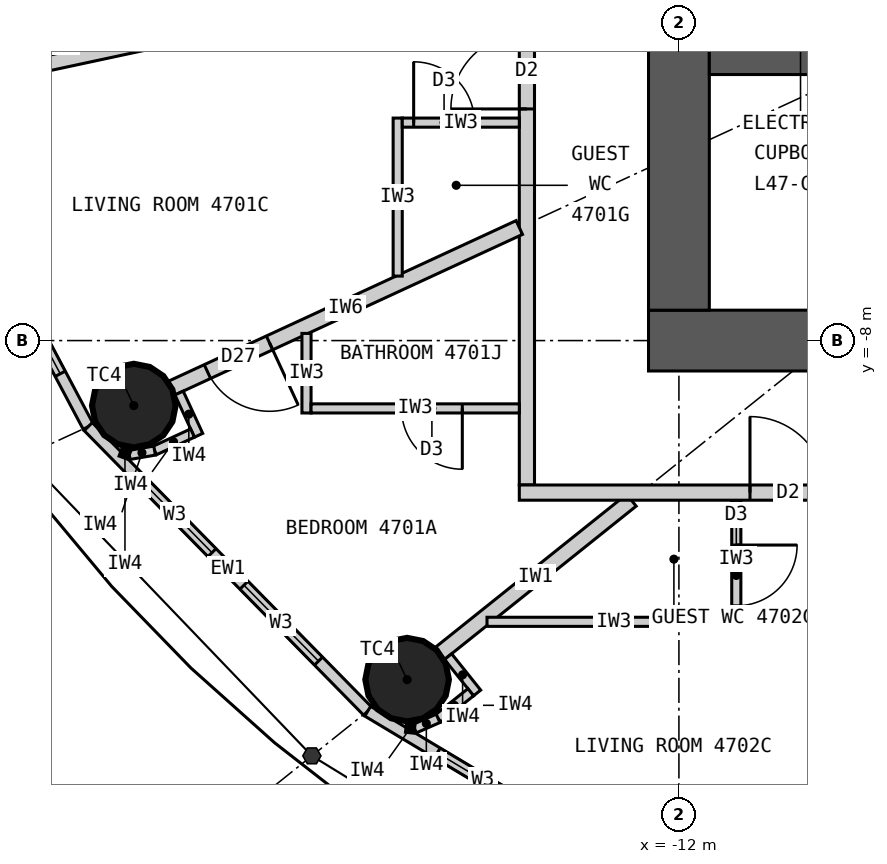
"""IFC4 building model, lengths in metres.
Left out: names, types, materials, properties, quantities, classifications, styles, units other than length and angle.
Written with IfcOpenShell. Run it as: python <this file> out.ifc"""

import sys

from ifc_helpers import new_model, si_unit, direction, frame, frame_2d, origin, origin_2d, place, context, subcontext, project, spatial, rectangle, circle, extrude, element, fill, save


model = new_model("IFC4")
c1 = context("Model", 3, precision=1e-05, world=origin(), true_north=direction((0.0, 1.0)))
c2 = subcontext(c1, "Body", "Model", "MODEL_VIEW")
j1 = project(units=[si_unit("LENGTHUNIT", "METRE"), si_unit("PLANEANGLEUNIT", "RADIAN")], contexts=[c1])
p1 = place(None, origin())
s1 = spatial("IfcSite", under=j1, at=p1, CompositionType="ELEMENT")
p2 = place(p1, origin())
s2 = spatial("IfcBuilding", under=s1, at=p2, CompositionType="ELEMENT")
p3 = place(p2, frame((0.0, 0.0, 176.4)))
s3 = spatial("IfcBuildingStorey", under=s2, at=p3, CompositionType="ELEMENT", Elevation=176.4)
for number, where, z_axis, x_axis in (
    (1, (-19.172, -8.855, 0.0), (0.0, 0.0, 1.0), (1.0, 0.0, 0.0)),
    (2, (-15.576, -12.461, 0.0), (0.0, 0.0, 1.0), (1.0, 0.0, 0.0)),
):
    element("IfcColumn", number, at=place(p3, frame(where, z_axis=z_axis, x_axis=x_axis)), inside=s3, PredefinedType="COLUMN", context=c2, shape_type="SweptSolid", body=[
        extrude(circle(Radius=0.55, at=origin_2d()), origin(), (0.0, 0.0, 1.0), 3.3),
    ])
p4 = place(p3, frame((12.4, -8.0, 0.0), z_axis=(0.0, 0.0, 1.0), x_axis=(-1.0, 0.0, 0.0)))
e3 = element("IfcWall", 3, at=p4, inside=s3, PredefinedType="SHEAR", context=c2, shape_type="SweptSolid", body=[
    extrude(rectangle(XDim=24.8, YDim=0.8, at=frame_2d((12.4, 0.0))), origin(), (0.0, 0.0, 1.0), 3.3),
])
p5 = place(p4, frame((11.1, 0.0, 0.0)))
e4 = element("IfcOpeningElement", 4, at=p5, cuts=e3, PredefinedType="OPENING", context=c2, shape_type="SweptSolid", body=[
    extrude(rectangle(XDim=1.2, YDim=2.2, at=frame_2d((0.6, 1.1))), frame((0.0, 0.41, 0.0), z_axis=(0.0, -1.0, 0.0), x_axis=(1.0, 0.0, 0.0)), (0.0, 0.0, 1.0), 0.82),
])
p6 = place(p4, frame((18.7, 0.0, 0.0)))
e5 = element("IfcOpeningElement", 5, at=p6, cuts=e3, PredefinedType="OPENING", context=c2, shape_type="SweptSolid", body=[
    extrude(rectangle(XDim=0.9, YDim=2.2, at=frame_2d((0.45, 1.1))), frame((0.0, 0.41, 0.0), z_axis=(0.0, -1.0, 0.0), x_axis=(1.0, 0.0, 0.0)), (0.0, 0.0, 1.0), 0.82),
])
p7 = place(p3, frame((-12.0, 7.6, 0.0), z_axis=(0.0, 0.0, 1.0), x_axis=(0.0, -1.0, 0.0)))
e6 = element("IfcWall", 6, at=p7, inside=s3, PredefinedType="SHEAR", context=c2, shape_type="SweptSolid", body=[
    extrude(rectangle(XDim=15.2, YDim=0.8, at=frame_2d((7.6, 0.0))), origin(), (0.0, 0.0, 1.0), 3.3),
])
p8 = place(p7, frame((6.7, 0.0, 0.0)))
e7 = element("IfcOpeningElement", 7, at=p8, cuts=e6, PredefinedType="OPENING", context=c2, shape_type="SweptSolid", body=[
    extrude(rectangle(XDim=1.8, YDim=2.2, at=frame_2d((0.9, 1.1))), frame((0.0, 0.41, 0.0), z_axis=(0.0, -1.0, 0.0), x_axis=(1.0, 0.0, 0.0)), (0.0, 0.0, 1.0), 0.82),
])
p9 = place(p3, frame((-11.6, -4.3, 0.0), z_axis=(0.0, 0.0, 1.0), x_axis=(1.0, 0.0, 0.0)))
e8 = element("IfcWall", 8, at=p9, inside=s3, PredefinedType="SHEAR", context=c2, shape_type="SweptSolid", body=[
    extrude(rectangle(XDim=23.2, YDim=0.4, at=frame_2d((11.6, 0.0))), origin(), (0.0, 0.0, 1.0), 3.3),
])
p10 = place(p3, frame((-22.102, -4.738, 0.0), z_axis=(0.0, 0.0, 1.0), x_axis=(0.468428906714, -0.883501193748, 0.0)))
e9 = element("IfcWall", 9, at=p10, inside=s3, PredefinedType="ELEMENTEDWALL", context=c2, shape_type="SweptSolid", body=[
    extrude(rectangle(XDim=4.974, YDim=0.15, at=frame_2d((2.487, 0.0))), origin(), (0.0, 0.0, 1.0), 3.12),
])
p11 = place(p10, frame((0.787, 0.0, 0.9)))
e10 = element("IfcOpeningElement", 10, at=p11, cuts=e9, PredefinedType="OPENING", context=c2, shape_type="SweptSolid", body=[
    extrude(rectangle(XDim=1.4, YDim=1.9, at=frame_2d((0.7, 0.95))), frame((0.0, 0.085, 0.0), z_axis=(0.0, -1.0, 0.0), x_axis=(1.0, 0.0, 0.0)), (0.0, 0.0, 1.0), 0.17),
])
p12 = place(p10, frame((2.787, 0.0, 0.9)))
e11 = element("IfcOpeningElement", 11, at=p12, cuts=e9, PredefinedType="OPENING", context=c2, shape_type="SweptSolid", body=[
    extrude(rectangle(XDim=1.4, YDim=1.9, at=frame_2d((0.7, 0.95))), frame((0.0, 0.085, 0.0), z_axis=(0.0, -1.0, 0.0), x_axis=(1.0, 0.0, 0.0)), (0.0, 0.0, 1.0), 0.17),
])
p13 = place(p3, frame((-19.772, -9.132, 0.0), z_axis=(0.0, 0.0, 1.0), x_axis=(0.700727467776, -0.71342905457, 0.0)))
e12 = element("IfcWall", 12, at=p13, inside=s3, PredefinedType="ELEMENTEDWALL", context=c2, shape_type="SweptSolid", body=[
    extrude(rectangle(XDim=5.247, YDim=0.15, at=frame_2d((2.624, 0.0))), origin(), (0.0, 0.0, 1.0), 3.12),
])
p14 = place(p13, frame((0.924, 0.0, 0.9)))
e13 = element("IfcOpeningElement", 13, at=p14, cuts=e12, PredefinedType="OPENING", context=c2, shape_type="SweptSolid", body=[
    extrude(rectangle(XDim=1.4, YDim=1.9, at=frame_2d((0.7, 0.95))), frame((0.0, 0.085, 0.0), z_axis=(0.0, -1.0, 0.0), x_axis=(1.0, 0.0, 0.0)), (0.0, 0.0, 1.0), 0.17),
])
p15 = place(p13, frame((2.924, 0.0, 0.9)))
e14 = element("IfcOpeningElement", 14, at=p15, cuts=e12, PredefinedType="OPENING", context=c2, shape_type="SweptSolid", body=[
    extrude(rectangle(XDim=1.4, YDim=1.9, at=frame_2d((0.7, 0.95))), frame((0.0, 0.085, 0.0), z_axis=(0.0, -1.0, 0.0), x_axis=(1.0, 0.0, 0.0)), (0.0, 0.0, 1.0), 0.17),
])
p16 = place(p3, frame((-16.095, -12.876, 0.0), z_axis=(0.0, 0.0, 1.0), x_axis=(0.857695199231, -0.514158482587, 0.0)))
e15 = element("IfcWall", 15, at=p16, inside=s3, PredefinedType="ELEMENTEDWALL", context=c2, shape_type="SweptSolid", body=[
    extrude(rectangle(XDim=5.536, YDim=0.15, at=frame_2d((2.768, 0.0))), origin(), (0.0, 0.0, 1.0), 3.12),
])
p17 = place(p16, frame((1.068, 0.0, 0.9)))
e16 = element("IfcOpeningElement", 16, at=p17, cuts=e15, PredefinedType="OPENING", context=c2, shape_type="SweptSolid", body=[
    extrude(rectangle(XDim=1.4, YDim=1.9, at=frame_2d((0.7, 0.95))), frame((0.0, 0.085, 0.0), z_axis=(0.0, -1.0, 0.0), x_axis=(1.0, 0.0, 0.0)), (0.0, 0.0, 1.0), 0.17),
])
p18 = place(p16, frame((3.068, 0.0, 0.9)))
e17 = element("IfcOpeningElement", 17, at=p18, cuts=e15, PredefinedType="OPENING", context=c2, shape_type="SweptSolid", body=[
    extrude(rectangle(XDim=1.4, YDim=1.9, at=frame_2d((0.7, 0.95))), frame((0.0, 0.085, 0.0), z_axis=(0.0, -1.0, 0.0), x_axis=(1.0, 0.0, 0.0)), (0.0, 0.0, 1.0), 0.17),
])
p19 = place(p3, frame((-14.0, 9.9, 0.0), z_axis=(0.0, 0.0, 1.0), x_axis=(0.0, -1.0, 0.0)))
e18 = element("IfcWall", 18, at=p19, inside=s3, PredefinedType="PARTITIONING", context=c2, shape_type="SweptSolid", body=[
    extrude(rectangle(XDim=19.8, YDim=0.2, at=frame_2d((9.9, 0.0))), origin(), (0.0, 0.0, 1.0), 3.12),
])
p20 = place(p19, frame((13.853, 0.0, 0.0)))
e19 = element("IfcOpeningElement", 19, at=p20, cuts=e18, PredefinedType="OPENING", context=c2, shape_type="SweptSolid", body=[
    extrude(rectangle(XDim=1.0, YDim=2.2, at=frame_2d((0.5, 1.1))), frame((0.0, 0.11, 0.0), z_axis=(0.0, -1.0, 0.0), x_axis=(1.0, 0.0, 0.0)), (0.0, 0.0, 1.0), 0.22),
])
p21 = place(p19, frame((1.1, 0.0, 0.0)))
e20 = element("IfcOpeningElement", 20, at=p21, cuts=e18, PredefinedType="OPENING", context=c2, shape_type="SweptSolid", body=[
    extrude(rectangle(XDim=1.0, YDim=2.2, at=frame_2d((0.5, 1.1))), frame((0.0, 0.11, 0.0), z_axis=(0.0, -1.0, 0.0), x_axis=(1.0, 0.0, 0.0)), (0.0, 0.0, 1.0), 0.22),
])
p22 = place(p19, frame((3.688, 0.0, 0.0)))
e21 = element("IfcOpeningElement", 21, at=p22, cuts=e18, PredefinedType="OPENING", context=c2, shape_type="SweptSolid", body=[
    extrude(rectangle(XDim=1.0, YDim=2.2, at=frame_2d((0.5, 1.1))), frame((0.0, 0.11, 0.0), z_axis=(0.0, -1.0, 0.0), x_axis=(1.0, 0.0, 0.0)), (0.0, 0.0, 1.0), 0.22),
])
p23 = place(p19, frame((8.719, 0.0, 0.0)))
e22 = element("IfcOpeningElement", 22, at=p23, cuts=e18, PredefinedType="OPENING", context=c2, shape_type="SweptSolid", body=[
    extrude(rectangle(XDim=1.0, YDim=2.2, at=frame_2d((0.5, 1.1))), frame((0.0, 0.11, 0.0), z_axis=(0.0, -1.0, 0.0), x_axis=(1.0, 0.0, 0.0)), (0.0, 0.0, 1.0), 0.22),
])
p24 = place(p3, frame((-14.1, -3.022, 0.0), z_axis=(0.0, 0.0, 1.0), x_axis=(-0.977790639684, -0.209584028367, 0.0)))
e23 = element("IfcWall", 23, at=p24, inside=s3, PredefinedType="PARTITIONING", context=c2, shape_type="SweptSolid", body=[
    extrude(rectangle(XDim=6.98, YDim=0.2, at=frame_2d((3.49, 0.0))), origin(), (0.0, 0.0, 1.0), 2.42),
])
p25 = place(p3, frame((-14.1, -6.512, 0.0), z_axis=(0.0, 0.0, 1.0), x_axis=(-0.907823150669, -0.419353224751, 0.0)))
e24 = element("IfcWall", 24, at=p25, inside=s3, PredefinedType="PARTITIONING", context=c2, shape_type="SweptSolid", body=[
    extrude(rectangle(XDim=5.037, YDim=0.2, at=frame_2d((2.519, 0.0))), origin(), (0.0, 0.0, 1.0), 2.32),
])
p26 = place(p25, frame((3.62, 0.0, 0.0)))
e25 = element("IfcOpeningElement", 25, at=p26, cuts=e24, PredefinedType="OPENING", context=c2, shape_type="SweptSolid", body=[
    extrude(rectangle(XDim=0.9, YDim=2.1, at=frame_2d((0.45, 1.05))), frame((0.0, 0.11, 0.0), z_axis=(0.0, -1.0, 0.0), x_axis=(1.0, 0.0, 0.0)), (0.0, 0.0, 1.0), 0.22),
])
p27 = place(p3, frame((-12.625, -10.1, 0.0), z_axis=(0.0, 0.0, 1.0), x_axis=(-0.780876185034, -0.624685827954, 0.0)))
e26 = element("IfcWall", 26, at=p27, inside=s3, PredefinedType="PARTITIONING", context=c2, shape_type="SweptSolid", body=[
    extrude(rectangle(XDim=3.229, YDim=0.2, at=frame_2d((1.615, 0.0))), origin(), (0.0, 0.0, 1.0), 2.42),
])
p28 = place(p3, frame((-7.289, -10.1, 0.0), z_axis=(0.0, 0.0, 1.0), x_axis=(-0.585222595178, -0.810872686735, 0.0)))
e27 = element("IfcWall", 27, at=p28, inside=s3, PredefinedType="PARTITIONING", context=c2, shape_type="SweptSolid", body=[
    extrude(rectangle(XDim=5.722, YDim=0.2, at=frame_2d((2.861, 0.0))), origin(), (0.0, 0.0, 1.0), 2.42),
])
p29 = place(p28, frame((0.72, 0.0, 0.0)))
e28 = element("IfcOpeningElement", 28, at=p29, cuts=e27, PredefinedType="OPENING", context=c2, shape_type="SweptSolid", body=[
    extrude(rectangle(XDim=0.9, YDim=2.1, at=frame_2d((0.45, 1.05))), frame((0.0, 0.11, 0.0), z_axis=(0.0, -1.0, 0.0), x_axis=(1.0, 0.0, 0.0)), (0.0, 0.0, 1.0), 0.22),
])
p30 = place(p3, frame((-15.7, -7.152, 0.0), z_axis=(0.0, 0.0, 1.0), x_axis=(0.0, 1.0, 0.0)))
e29 = element("IfcWall", 29, at=p30, inside=s3, PredefinedType="PARTITIONING", context=c2, shape_type="SweptSolid", body=[
    extrude(rectangle(XDim=2.079, YDim=0.12, at=frame_2d((1.04, 0.0))), origin(), (0.0, 0.0, 1.0), 3.12),
])
p31 = place(p3, frame((-14.1, -5.133, 0.0), z_axis=(0.0, 0.0, 1.0), x_axis=(-1.0, 0.0, 0.0)))
e30 = element("IfcWall", 30, at=p31, inside=s3, PredefinedType="PARTITIONING", context=c2, shape_type="SweptSolid", body=[
    extrude(rectangle(XDim=1.54, YDim=0.12, at=frame_2d((0.77, 0.0))), origin(), (0.0, 0.0, 1.0), 3.12),
])
p32 = place(p31, frame((0.59, 0.0, 0.0)))
e31 = element("IfcOpeningElement", 31, at=p32, cuts=e30, PredefinedType="OPENING", context=c2, shape_type="SweptSolid", body=[
    extrude(rectangle(XDim=0.8, YDim=2.1, at=frame_2d((0.4, 1.05))), frame((0.0, 0.07, 0.0), z_axis=(0.0, -1.0, 0.0), x_axis=(1.0, 0.0, 0.0)), (0.0, 0.0, 1.0), 0.14),
])
p33 = place(p3, frame((-16.9, -7.906, 0.0), z_axis=(0.0, 0.0, 1.0), x_axis=(0.0, -1.0, 0.0)))
e32 = element("IfcWall", 32, at=p33, inside=s3, PredefinedType="PARTITIONING", context=c2, shape_type="SweptSolid", body=[
    extrude(rectangle(XDim=1.047, YDim=0.12, at=frame_2d((0.523, 0.0))), origin(), (0.0, 0.0, 1.0), 3.12),
])
p34 = place(p3, frame((-14.1, -8.893, 0.0), z_axis=(0.0, 0.0, 1.0), x_axis=(-1.0, 0.0, 0.0)))
e33 = element("IfcWall", 33, at=p34, inside=s3, PredefinedType="PARTITIONING", context=c2, shape_type="SweptSolid", body=[
    extrude(rectangle(XDim=2.74, YDim=0.12, at=frame_2d((1.37, 0.0))), origin(), (0.0, 0.0, 1.0), 3.12),
])
p35 = place(p34, frame((0.75, 0.0, 0.0)))
e34 = element("IfcOpeningElement", 34, at=p35, cuts=e33, PredefinedType="OPENING", context=c2, shape_type="SweptSolid", body=[
    extrude(rectangle(XDim=0.8, YDim=2.1, at=frame_2d((0.4, 1.05))), frame((0.0, 0.07, 0.0), z_axis=(0.0, -1.0, 0.0), x_axis=(1.0, 0.0, 0.0)), (0.0, 0.0, 1.0), 0.14),
])
p36 = place(p3, frame((-14.525, -11.7, 0.0), z_axis=(0.0, 0.0, 1.0), x_axis=(1.0, 0.0, 0.0)))
e35 = element("IfcWall", 35, at=p36, inside=s3, PredefinedType="PARTITIONING", context=c2, shape_type="SweptSolid", body=[
    extrude(rectangle(XDim=3.34, YDim=0.12, at=frame_2d((1.67, 0.0))), origin(), (0.0, 0.0, 1.0), 3.12),
])
p37 = place(p3, frame((-11.245, -10.1, 0.0), z_axis=(0.0, 0.0, 1.0), x_axis=(0.0, -1.0, 0.0)))
e36 = element("IfcWall", 36, at=p37, inside=s3, PredefinedType="PARTITIONING", context=c2, shape_type="SweptSolid", body=[
    extrude(rectangle(XDim=1.54, YDim=0.12, at=frame_2d((0.77, 0.0))), origin(), (0.0, 0.0, 1.0), 3.12),
])
p38 = place(p37, frame((0.59, 0.0, 0.0)))
e37 = element("IfcOpeningElement", 37, at=p38, cuts=e36, PredefinedType="OPENING", context=c2, shape_type="SweptSolid", body=[
    extrude(rectangle(XDim=0.8, YDim=2.1, at=frame_2d((0.4, 1.05))), frame((0.0, 0.07, 0.0), z_axis=(0.0, -1.0, 0.0), x_axis=(1.0, 0.0, 0.0)), (0.0, 0.0, 1.0), 0.14),
])
p39 = place(p3, frame((-0.006, -10.0, 0.0), z_axis=(0.0, 0.0, 1.0), x_axis=(-1.0, 0.0, 0.0)))
e38 = element("IfcWall", 38, at=p39, inside=s3, PredefinedType="PARTITIONING", context=c2, shape_type="SweptSolid", body=[
    extrude(rectangle(XDim=14.094, YDim=0.2, at=frame_2d((7.047, 0.0))), origin(), (0.0, 0.0, 1.0), 3.12),
])
p40 = place(p39, frame((10.059, 0.0, 0.0)))
e39 = element("IfcOpeningElement", 39, at=p40, cuts=e38, PredefinedType="OPENING", context=c2, shape_type="SweptSolid", body=[
    extrude(rectangle(XDim=1.0, YDim=2.2, at=frame_2d((0.5, 1.1))), frame((0.0, 0.11, 0.0), z_axis=(0.0, -1.0, 0.0), x_axis=(1.0, 0.0, 0.0)), (0.0, 0.0, 1.0), 0.22),
])
p41 = place(p3, frame((-18.576, -8.69, 0.0), z_axis=(0.0, 0.0, 1.0), x_axis=(0.419083463716, -0.907947713494, 0.0)))
e40 = element("IfcWall", 40, at=p41, inside=s3, PredefinedType="PARTITIONING", context=c2, shape_type="SweptSolid", body=[
    extrude(rectangle(XDim=0.612, YDim=0.12, at=frame_2d((0.306, 0.0))), origin(), (0.0, 0.0, 1.0), 3.12),
])
p42 = place(p3, frame((-18.399, -9.217, 0.0), z_axis=(0.0, 0.0, 1.0), x_axis=(-0.907933393845, -0.419114485961, 0.0)))
e41 = element("IfcWall", 41, at=p42, inside=s3, PredefinedType="PARTITIONING", context=c2, shape_type="SweptSolid", body=[
    extrude(rectangle(XDim=0.55, YDim=0.12, at=frame_2d((0.275, 0.0))), origin(), (0.0, 0.0, 1.0), 3.12),
])
p43 = place(p3, frame((-18.899, -9.447, 0.0), z_axis=(0.0, 0.0, 1.0), x_axis=(-0.985338822624, -0.170608923066, 0.0)))
e42 = element("IfcWall", 42, at=p43, inside=s3, PredefinedType="PARTITIONING", context=c2, shape_type="SweptSolid", body=[
    extrude(rectangle(XDim=0.338, YDim=0.12, at=frame_2d((0.169, 0.0))), origin(), (0.0, 0.0, 1.0), 3.12),
])
p44 = place(p3, frame((-19.231, -9.505, 0.0), z_axis=(0.0, 0.0, 1.0), x_axis=(-0.938377418573, 0.345612239817, 0.0)))
e43 = element("IfcWall", 43, at=p44, inside=s3, PredefinedType="PARTITIONING", context=c2, shape_type="SweptSolid", body=[
    extrude(rectangle(XDim=0.122, YDim=0.12, at=frame_2d((0.061, 0.0))), origin(), (0.0, 0.0, 1.0), 3.12),
])
p45 = place(p3, frame((-15.037, -12.158, 0.0), z_axis=(0.0, 0.0, 1.0), x_axis=(0.624840920722, -0.78075208856, 0.0)))
e44 = element("IfcWall", 44, at=p45, inside=s3, PredefinedType="PARTITIONING", context=c2, shape_type="SweptSolid", body=[
    extrude(rectangle(XDim=0.612, YDim=0.12, at=frame_2d((0.306, 0.0))), origin(), (0.0, 0.0, 1.0), 3.12),
])
p46 = place(p3, frame((-14.739, -12.627, 0.0), z_axis=(0.0, 0.0, 1.0), x_axis=(-0.780912119987, -0.624640905527, 0.0)))
e45 = element("IfcWall", 45, at=p46, inside=s3, PredefinedType="PARTITIONING", context=c2, shape_type="SweptSolid", body=[
    extrude(rectangle(XDim=0.55, YDim=0.12, at=frame_2d((0.275, 0.0))), origin(), (0.0, 0.0, 1.0), 3.12),
])
p47 = place(p3, frame((-15.169, -12.97, 0.0), z_axis=(0.0, 0.0, 1.0), x_axis=(-0.915974725257, -0.401235968838, 0.0)))
e46 = element("IfcWall", 46, at=p47, inside=s3, PredefinedType="PARTITIONING", context=c2, shape_type="SweptSolid", body=[
    extrude(rectangle(XDim=0.338, YDim=0.12, at=frame_2d((0.169, 0.0))), origin(), (0.0, 0.0, 1.0), 3.12),
])
p48 = place(p3, frame((-15.478, -13.106, 0.0), z_axis=(0.0, 0.0, 1.0), x_axis=(-0.993778813557, 0.111371763588, 0.0)))
e47 = element("IfcWall", 47, at=p48, inside=s3, PredefinedType="PARTITIONING", context=c2, shape_type="SweptSolid", body=[
    extrude(rectangle(XDim=0.114, YDim=0.12, at=frame_2d((0.057, 0.0))), origin(), (0.0, 0.0, 1.0), 3.12),
])
p49 = place(p12, origin())
e48 = element("IfcWindow", 48, at=p49, inside=s3, PartitioningType="SINGLE_PANEL", PredefinedType="WINDOW", context=c2, shape_type="SweptSolid", body=[
    extrude(rectangle(XDim=1.4, YDim=1.9, at=frame_2d((0.7, 0.95))), frame((0.0, 0.03, 0.0), z_axis=(0.0, -1.0, 0.0), x_axis=(1.0, 0.0, 0.0)), (0.0, 0.0, 1.0), 0.06),
])
fill(e11, e48)
p50 = place(p14, origin())
e49 = element("IfcWindow", 49, at=p50, inside=s3, PartitioningType="SINGLE_PANEL", PredefinedType="WINDOW", context=c2, shape_type="SweptSolid", body=[
    extrude(rectangle(XDim=1.4, YDim=1.9, at=frame_2d((0.7, 0.95))), frame((0.0, 0.03, 0.0), z_axis=(0.0, -1.0, 0.0), x_axis=(1.0, 0.0, 0.0)), (0.0, 0.0, 1.0), 0.06),
])
fill(e13, e49)
p51 = place(p15, origin())
e50 = element("IfcWindow", 50, at=p51, inside=s3, PartitioningType="SINGLE_PANEL", PredefinedType="WINDOW", context=c2, shape_type="SweptSolid", body=[
    extrude(rectangle(XDim=1.4, YDim=1.9, at=frame_2d((0.7, 0.95))), frame((0.0, 0.03, 0.0), z_axis=(0.0, -1.0, 0.0), x_axis=(1.0, 0.0, 0.0)), (0.0, 0.0, 1.0), 0.06),
])
fill(e14, e50)
p52 = place(p17, origin())
e51 = element("IfcWindow", 51, at=p52, inside=s3, PartitioningType="SINGLE_PANEL", PredefinedType="WINDOW", context=c2, shape_type="SweptSolid", body=[
    extrude(rectangle(XDim=1.4, YDim=1.9, at=frame_2d((0.7, 0.95))), frame((0.0, 0.03, 0.0), z_axis=(0.0, -1.0, 0.0), x_axis=(1.0, 0.0, 0.0)), (0.0, 0.0, 1.0), 0.06),
])
fill(e16, e51)
p53 = place(p32, origin())
e52 = element("IfcDoor", 52, at=p53, inside=s3, OperationType="SINGLE_SWING_RIGHT", PredefinedType="DOOR", context=c2, shape_type="SweptSolid", body=[
    extrude(rectangle(XDim=0.8, YDim=2.1, at=frame_2d((0.4, 1.05))), frame((0.0, 0.025, 0.0), z_axis=(0.0, -1.0, 0.0), x_axis=(1.0, 0.0, 0.0)), (0.0, 0.0, 1.0), 0.05),
])
fill(e31, e52)
p54 = place(p20, origin())
e53 = element("IfcDoor", 53, at=p54, inside=s3, OperationType="SINGLE_SWING_RIGHT", PredefinedType="DOOR", context=c2, shape_type="SweptSolid", body=[
    extrude(rectangle(XDim=1.0, YDim=2.2, at=frame_2d((0.5, 1.1))), frame((0.0, 0.025, 0.0), z_axis=(0.0, -1.0, 0.0), x_axis=(1.0, 0.0, 0.0)), (0.0, 0.0, 1.0), 0.05),
])
fill(e19, e53)
p55 = place(p35, origin())
e54 = element("IfcDoor", 54, at=p55, inside=s3, OperationType="SINGLE_SWING_LEFT", PredefinedType="DOOR", context=c2, shape_type="SweptSolid", body=[
    extrude(rectangle(XDim=0.8, YDim=2.1, at=frame_2d((0.4, 1.05))), frame((0.0, 0.025, 0.0), z_axis=(0.0, -1.0, 0.0), x_axis=(1.0, 0.0, 0.0)), (0.0, 0.0, 1.0), 0.05),
])
fill(e34, e54)
p56 = place(p26, origin())
e55 = element("IfcDoor", 55, at=p56, inside=s3, OperationType="SINGLE_SWING_LEFT", PredefinedType="DOOR", context=c2, shape_type="SweptSolid", body=[
    extrude(rectangle(XDim=0.9, YDim=2.1, at=frame_2d((0.45, 1.05))), frame((0.0, 0.025, 0.0), z_axis=(0.0, -1.0, 0.0), x_axis=(1.0, 0.0, 0.0)), (0.0, 0.0, 1.0), 0.05),
])
fill(e25, e55)
p57 = place(p38, origin())
e56 = element("IfcDoor", 56, at=p57, inside=s3, OperationType="SINGLE_SWING_LEFT", PredefinedType="DOOR", context=c2, shape_type="SweptSolid", body=[
    extrude(rectangle(XDim=0.8, YDim=2.1, at=frame_2d((0.4, 1.05))), frame((0.0, 0.025, 0.0), z_axis=(0.0, -1.0, 0.0), x_axis=(1.0, 0.0, 0.0)), (0.0, 0.0, 1.0), 0.05),
])
fill(e37, e56)
p58 = place(p40, origin())
e57 = element("IfcDoor", 57, at=p58, inside=s3, OperationType="SINGLE_SWING_RIGHT", PredefinedType="DOOR", context=c2, shape_type="SweptSolid", body=[
    extrude(rectangle(XDim=1.0, YDim=2.2, at=frame_2d((0.5, 1.1))), frame((0.0, 0.025, 0.0), z_axis=(0.0, -1.0, 0.0), x_axis=(1.0, 0.0, 0.0)), (0.0, 0.0, 1.0), 0.05),
])
fill(e39, e57)
save(model, sys.argv[1])
